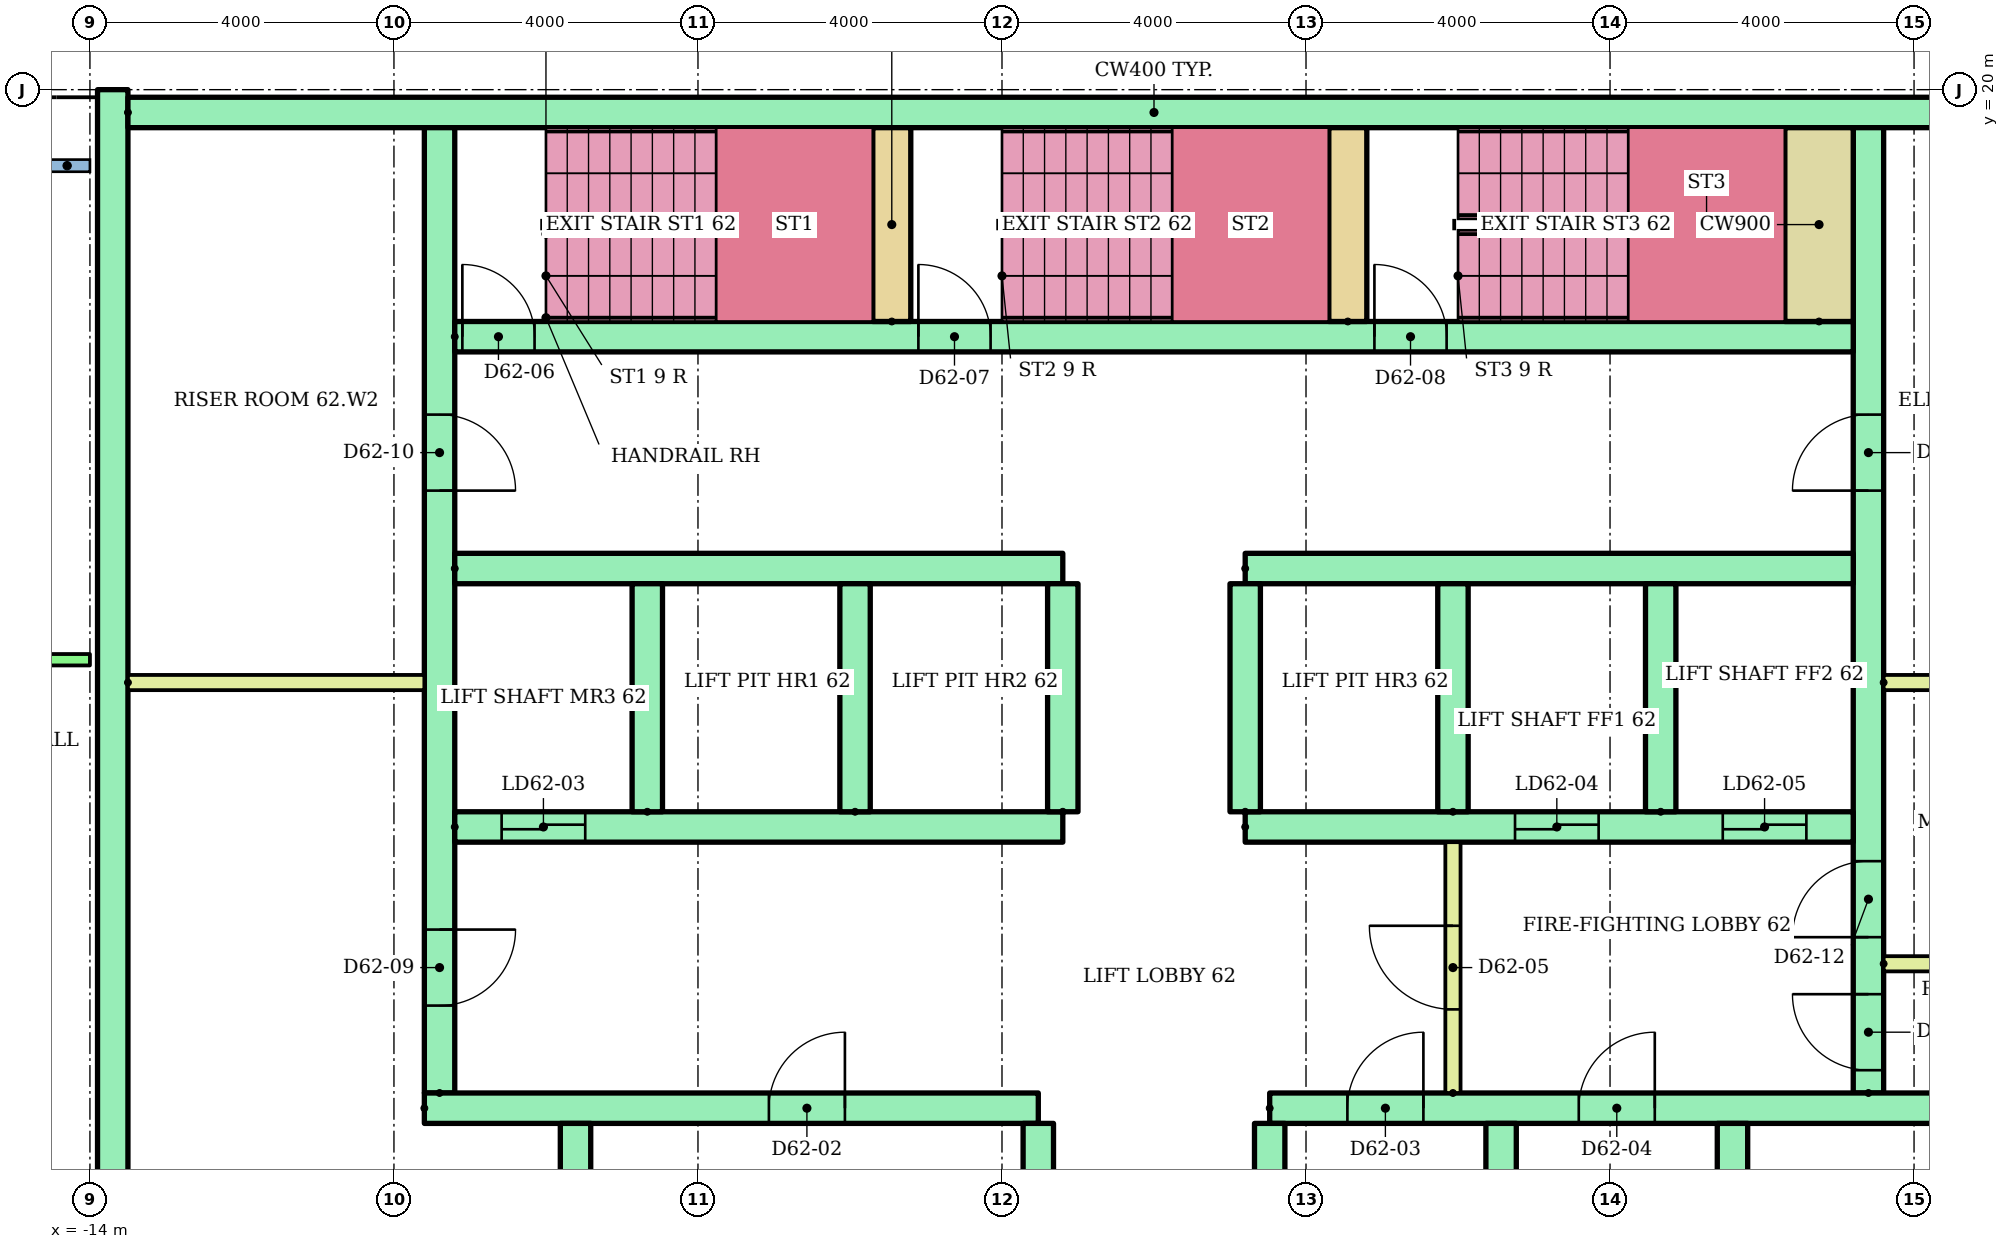
"""IFC4 building model, lengths in metres.
Left out: names, types, materials, properties, quantities, classifications, styles, units other than length and angle.
Written with IfcOpenShell. Run it as: python <this file> out.ifc"""

import sys

from ifc_helpers import new_model, si_unit, direction, frame, frame_2d, origin, place, context, subcontext, project, spatial, rectangle, extrude, element, fill, save


model = new_model("IFC4")
c1 = context("Model", 3, precision=1e-05, world=origin(), true_north=direction((0.0, 1.0)))
c2 = subcontext(c1, "Body", "Model", "MODEL_VIEW")
j1 = project(units=[si_unit("LENGTHUNIT", "METRE"), si_unit("PLANEANGLEUNIT", "RADIAN")], contexts=[c1])
p1 = place(None, origin())
s1 = spatial("IfcSite", under=j1, at=p1, CompositionType="ELEMENT")
p2 = place(p1, origin())
s2 = spatial("IfcBuilding", under=s1, at=p2, CompositionType="ELEMENT")
p3 = place(p2, frame((0.0, 0.0, 236.4)))
s3 = spatial("IfcBuildingStorey", under=s2, at=p3, CompositionType="ELEMENT", Elevation=236.4)
p4 = place(p3, frame((-13.7, 3.0, 0.0), z_axis=(0.0, 0.0, 1.0), x_axis=(0.0, 1.0, 0.0)))
e1 = element("IfcWall", 1, at=p4, inside=s3, PredefinedType="SHEAR", context=c2, shape_type="SweptSolid", body=[
    extrude(rectangle(XDim=17.0, YDim=0.4, at=frame_2d((8.5, 0.0))), origin(), (0.0, 0.0, 1.0), 2.8),
])
p5 = place(p3, frame((-13.5, 19.7, 0.0)))
e2 = element("IfcWall", 2, at=p5, inside=s3, PredefinedType="SHEAR", context=c2, shape_type="SweptSolid", body=[
    extrude(rectangle(XDim=27.0, YDim=0.4, at=frame_2d((13.5, 0.0))), origin(), (0.0, 0.0, 1.0), 2.8),
])
p6 = place(p3, frame((-9.4, 6.8, 0.0), z_axis=(0.0, 0.0, 1.0), x_axis=(0.0, 1.0, 0.0)))
e3 = element("IfcWall", 3, at=p6, inside=s3, PredefinedType="SHEAR", context=c2, shape_type="SweptSolid", body=[
    extrude(rectangle(XDim=12.7, YDim=0.4, at=frame_2d((6.35, 0.0))), origin(), (0.0, 0.0, 1.0), 2.8),
])
p7 = place(p6, frame((1.15, 0.0, 0.0)))
e4 = element("IfcOpeningElement", 4, at=p7, cuts=e3, PredefinedType="OPENING", context=c2, shape_type="SweptSolid", body=[
    extrude(rectangle(XDim=1.0, YDim=2.1, at=frame_2d((0.5, 1.05))), frame((0.0, 0.21, 0.0), z_axis=(0.0, -1.0, 0.0), x_axis=(1.0, 0.0, 0.0)), (0.0, 0.0, 1.0), 0.42),
])
p8 = place(p6, frame((7.925, 0.0, 0.0)))
e5 = element("IfcOpeningElement", 5, at=p8, cuts=e3, PredefinedType="OPENING", context=c2, shape_type="SweptSolid", body=[
    extrude(rectangle(XDim=1.0, YDim=2.1, at=frame_2d((0.5, 1.05))), frame((0.0, 0.21, 0.0), z_axis=(0.0, -1.0, 0.0), x_axis=(1.0, 0.0, 0.0)), (0.0, 0.0, 1.0), 0.42),
])
p9 = place(p3, frame((9.4, 6.8, 0.0), z_axis=(0.0, 0.0, 1.0), x_axis=(0.0, 1.0, 0.0)))
e6 = element("IfcWall", 6, at=p9, inside=s3, PredefinedType="SHEAR", context=c2, shape_type="SweptSolid", body=[
    extrude(rectangle(XDim=12.7, YDim=0.4, at=frame_2d((6.35, 0.0))), origin(), (0.0, 0.0, 1.0), 2.8),
])
p10 = place(p9, frame((0.3, 0.0, 0.0)))
e7 = element("IfcOpeningElement", 7, at=p10, cuts=e6, PredefinedType="OPENING", context=c2, shape_type="SweptSolid", body=[
    extrude(rectangle(XDim=1.0, YDim=2.1, at=frame_2d((0.5, 1.05))), frame((0.0, 0.21, 0.0), z_axis=(0.0, -1.0, 0.0), x_axis=(1.0, 0.0, 0.0)), (0.0, 0.0, 1.0), 0.42),
])
p11 = place(p9, frame((2.05, 0.0, 0.0)))
e8 = element("IfcOpeningElement", 8, at=p11, cuts=e6, PredefinedType="OPENING", context=c2, shape_type="SweptSolid", body=[
    extrude(rectangle(XDim=1.0, YDim=2.1, at=frame_2d((0.5, 1.05))), frame((0.0, 0.21, 0.0), z_axis=(0.0, -1.0, 0.0), x_axis=(1.0, 0.0, 0.0)), (0.0, 0.0, 1.0), 0.42),
])
p12 = place(p9, frame((7.925, 0.0, 0.0)))
e9 = element("IfcOpeningElement", 9, at=p12, cuts=e6, PredefinedType="OPENING", context=c2, shape_type="SweptSolid", body=[
    extrude(rectangle(XDim=1.0, YDim=2.1, at=frame_2d((0.5, 1.05))), frame((0.0, 0.21, 0.0), z_axis=(0.0, -1.0, 0.0), x_axis=(1.0, 0.0, 0.0)), (0.0, 0.0, 1.0), 0.42),
])
p13 = place(p3, frame((-9.6, 6.6, 0.0)))
e10 = element("IfcWall", 10, at=p13, inside=s3, PredefinedType="SHEAR", context=c2, shape_type="SweptSolid", body=[
    extrude(rectangle(XDim=8.078, YDim=0.4, at=frame_2d((4.039, 0.0))), origin(), (0.0, 0.0, 1.0), 2.8),
])
p14 = place(p13, frame((4.533, 0.0, 0.0)))
e11 = element("IfcOpeningElement", 11, at=p14, cuts=e10, PredefinedType="OPENING", context=c2, shape_type="SweptSolid", body=[
    extrude(rectangle(XDim=1.0, YDim=2.1, at=frame_2d((0.5, 1.05))), frame((0.0, 0.21, 0.0), z_axis=(0.0, -1.0, 0.0), x_axis=(1.0, 0.0, 0.0)), (0.0, 0.0, 1.0), 0.42),
])
p15 = place(p3, frame((1.522, 6.6, 0.0)))
e12 = element("IfcWall", 12, at=p15, inside=s3, PredefinedType="SHEAR", context=c2, shape_type="SweptSolid", body=[
    extrude(rectangle(XDim=11.978, YDim=0.4, at=frame_2d((5.989, 0.0))), origin(), (0.0, 0.0, 1.0), 2.8),
])
p16 = place(p15, frame((1.022, 0.0, 0.0)))
e13 = element("IfcOpeningElement", 13, at=p16, cuts=e12, PredefinedType="OPENING", context=c2, shape_type="SweptSolid", body=[
    extrude(rectangle(XDim=1.0, YDim=2.1, at=frame_2d((0.5, 1.05))), frame((0.0, 0.21, 0.0), z_axis=(0.0, -1.0, 0.0), x_axis=(1.0, 0.0, 0.0)), (0.0, 0.0, 1.0), 0.42),
])
p17 = place(p15, frame((4.067, 0.0, 0.0)))
e14 = element("IfcOpeningElement", 14, at=p17, cuts=e12, PredefinedType="OPENING", context=c2, shape_type="SweptSolid", body=[
    extrude(rectangle(XDim=1.0, YDim=2.1, at=frame_2d((0.5, 1.05))), frame((0.0, 0.21, 0.0), z_axis=(0.0, -1.0, 0.0), x_axis=(1.0, 0.0, 0.0)), (0.0, 0.0, 1.0), 0.42),
])
for number, where, z_axis, x_axis in (
    (15, (-7.611, 3.4, 0.0), (0.0, 0.0, 1.0), (0.0, 1.0, 0.0)),
    (16, (-1.522, 3.4, 0.0), (0.0, 0.0, 1.0), (0.0, 1.0, 0.0)),
    (17, (1.522, 3.4, 0.0), (0.0, 0.0, 1.0), (0.0, 1.0, 0.0)),
    (18, (4.567, 3.4, 0.0), (0.0, 0.0, 1.0), (0.0, 1.0, 0.0)),
    (19, (7.611, 3.4, 0.0), (0.0, 0.0, 1.0), (0.0, 1.0, 0.0)),
):
    element("IfcWall", number, at=place(p3, frame(where, z_axis=z_axis, x_axis=x_axis)), inside=s3, PredefinedType="SHEAR", context=c2, shape_type="SweptSolid", body=[
        extrude(rectangle(XDim=3.0, YDim=0.4, at=frame_2d((1.5, 0.0))), origin(), (0.0, 0.0, 1.0), 2.8),
    ])
p18 = place(p3, frame((-9.2, 10.3, 0.0)))
e20 = element("IfcWall", 20, at=p18, inside=s3, PredefinedType="SHEAR", context=c2, shape_type="SweptSolid", body=[
    extrude(rectangle(XDim=8.0, YDim=0.4, at=frame_2d((4.0, 0.0))), origin(), (0.0, 0.0, 1.0), 2.8),
])
p19 = place(p18, frame((0.617, 0.0, 0.0)))
e21 = element("IfcOpeningElement", 21, at=p19, cuts=e20, PredefinedType="OPENING", context=c2, shape_type="SweptSolid", body=[
    extrude(rectangle(XDim=1.1, YDim=2.1, at=frame_2d((0.55, 1.05))), frame((0.0, 0.21, 0.0), z_axis=(0.0, -1.0, 0.0), x_axis=(1.0, 0.0, 0.0)), (0.0, 0.0, 1.0), 0.42),
])
p20 = place(p3, frame((-9.2, 13.7, 0.0)))
e22 = element("IfcWall", 22, at=p20, inside=s3, PredefinedType="SHEAR", context=c2, shape_type="SweptSolid", body=[
    extrude(rectangle(XDim=8.0, YDim=0.4, at=frame_2d((4.0, 0.0))), origin(), (0.0, 0.0, 1.0), 2.8),
])
p21 = place(p3, frame((1.2, 10.3, 0.0)))
e23 = element("IfcWall", 23, at=p21, inside=s3, PredefinedType="SHEAR", context=c2, shape_type="SweptSolid", body=[
    extrude(rectangle(XDim=8.0, YDim=0.4, at=frame_2d((4.0, 0.0))), origin(), (0.0, 0.0, 1.0), 2.8),
])
p22 = place(p21, frame((3.55, 0.0, 0.0)))
e24 = element("IfcOpeningElement", 24, at=p22, cuts=e23, PredefinedType="OPENING", context=c2, shape_type="SweptSolid", body=[
    extrude(rectangle(XDim=1.1, YDim=2.1, at=frame_2d((0.55, 1.05))), frame((0.0, 0.21, 0.0), z_axis=(0.0, -1.0, 0.0), x_axis=(1.0, 0.0, 0.0)), (0.0, 0.0, 1.0), 0.42),
])
p23 = place(p21, frame((6.283, 0.0, 0.0)))
e25 = element("IfcOpeningElement", 25, at=p23, cuts=e23, PredefinedType="OPENING", context=c2, shape_type="SweptSolid", body=[
    extrude(rectangle(XDim=1.1, YDim=2.1, at=frame_2d((0.55, 1.05))), frame((0.0, 0.21, 0.0), z_axis=(0.0, -1.0, 0.0), x_axis=(1.0, 0.0, 0.0)), (0.0, 0.0, 1.0), 0.42),
])
p24 = place(p3, frame((1.2, 13.7, 0.0)))
e26 = element("IfcWall", 26, at=p24, inside=s3, PredefinedType="SHEAR", context=c2, shape_type="SweptSolid", body=[
    extrude(rectangle(XDim=8.0, YDim=0.4, at=frame_2d((4.0, 0.0))), origin(), (0.0, 0.0, 1.0), 2.8),
])
for number, where, z_axis, x_axis in (
    (27, (-6.667, 10.5, 0.0), (0.0, 0.0, 1.0), (0.0, 1.0, 0.0)),
    (28, (-3.933, 10.5, 0.0), (0.0, 0.0, 1.0), (0.0, 1.0, 0.0)),
    (29, (-1.2, 10.5, 0.0), (0.0, 0.0, 1.0), (0.0, 1.0, 0.0)),
    (30, (1.2, 10.5, 0.0), (0.0, 0.0, 1.0), (0.0, 1.0, 0.0)),
    (31, (3.933, 10.5, 0.0), (0.0, 0.0, 1.0), (0.0, 1.0, 0.0)),
    (32, (6.667, 10.5, 0.0), (0.0, 0.0, 1.0), (0.0, 1.0, 0.0)),
):
    element("IfcWall", number, at=place(p3, frame(where, z_axis=z_axis, x_axis=x_axis)), inside=s3, PredefinedType="SHEAR", context=c2, shape_type="SweptSolid", body=[
        extrude(rectangle(XDim=3.0, YDim=0.4, at=frame_2d((1.5, 0.0))), origin(), (0.0, 0.0, 1.0), 2.8),
    ])
p25 = place(p3, frame((3.933, 6.8, 0.0), z_axis=(0.0, 0.0, 1.0), x_axis=(0.0, 1.0, 0.0)))
e33 = element("IfcWall", 33, at=p25, inside=s3, PredefinedType="PARTITIONING", context=c2, shape_type="SweptSolid", body=[
    extrude(rectangle(XDim=3.3, YDim=0.2, at=frame_2d((1.65, 0.0))), origin(), (0.0, 0.0, 1.0), 2.8),
])
p26 = place(p25, frame((1.1, 0.0, 0.0)))
e34 = element("IfcOpeningElement", 34, at=p26, cuts=e33, PredefinedType="OPENING", context=c2, shape_type="SweptSolid", body=[
    extrude(rectangle(XDim=1.1, YDim=2.1, at=frame_2d((0.55, 1.05))), frame((0.0, 0.11, 0.0), z_axis=(0.0, -1.0, 0.0), x_axis=(1.0, 0.0, 0.0)), (0.0, 0.0, 1.0), 0.22),
])
p27 = place(p3, frame((-9.2, 16.75, 0.0)))
e35 = element("IfcWall", 35, at=p27, inside=s3, PredefinedType="SHEAR", context=c2, shape_type="SweptSolid", body=[
    extrude(rectangle(XDim=18.4, YDim=0.4, at=frame_2d((9.2, 0.0))), origin(), (0.0, 0.0, 1.0), 2.8),
])
p28 = place(p27, frame((0.1, 0.0, 0.0)))
e36 = element("IfcOpeningElement", 36, at=p28, cuts=e35, PredefinedType="OPENING", context=c2, shape_type="SweptSolid", body=[
    extrude(rectangle(XDim=0.95, YDim=2.1, at=frame_2d((0.475, 1.05))), frame((0.0, 0.21, 0.0), z_axis=(0.0, -1.0, 0.0), x_axis=(1.0, 0.0, 0.0)), (0.0, 0.0, 1.0), 0.42),
])
p29 = place(p27, frame((6.1, 0.0, 0.0)))
e37 = element("IfcOpeningElement", 37, at=p29, cuts=e35, PredefinedType="OPENING", context=c2, shape_type="SweptSolid", body=[
    extrude(rectangle(XDim=0.95, YDim=2.1, at=frame_2d((0.475, 1.05))), frame((0.0, 0.21, 0.0), z_axis=(0.0, -1.0, 0.0), x_axis=(1.0, 0.0, 0.0)), (0.0, 0.0, 1.0), 0.42),
])
p30 = place(p27, frame((12.1, 0.0, 0.0)))
e38 = element("IfcOpeningElement", 38, at=p30, cuts=e35, PredefinedType="OPENING", context=c2, shape_type="SweptSolid", body=[
    extrude(rectangle(XDim=0.95, YDim=2.1, at=frame_2d((0.475, 1.05))), frame((0.0, 0.21, 0.0), z_axis=(0.0, -1.0, 0.0), x_axis=(1.0, 0.0, 0.0)), (0.0, 0.0, 1.0), 0.42),
])
for number, where, z_axis, x_axis in (
    (39, (-3.45, 16.95, 0.0), (0.0, 0.0, 1.0), (0.0, 1.0, 0.0)),
    (40, (2.55, 16.95, 0.0), (0.0, 0.0, 1.0), (0.0, 1.0, 0.0)),
):
    element("IfcWall", number, at=place(p3, frame(where, z_axis=z_axis, x_axis=x_axis)), inside=s3, PredefinedType="SHEAR", context=c2, shape_type="SweptSolid", body=[
        extrude(rectangle(XDim=2.55, YDim=0.5, at=frame_2d((1.275, 0.0))), origin(), (0.0, 0.0, 1.0), 2.8),
    ])
p31 = place(p3, frame((8.75, 16.95, 0.0), z_axis=(0.0, 0.0, 1.0), x_axis=(0.0, 1.0, 0.0)))
e41 = element("IfcWall", 41, at=p31, inside=s3, PredefinedType="SHEAR", context=c2, shape_type="SweptSolid", body=[
    extrude(rectangle(XDim=2.55, YDim=0.9, at=frame_2d((1.275, 0.0))), origin(), (0.0, 0.0, 1.0), 2.8),
])
for number, where in (
    (42, (-13.5, 12.2, 0.0)),
    (43, (9.6, 8.5, 0.0)),
    (44, (9.6, 12.2, 0.0)),
):
    element("IfcWall", number, at=place(p3, frame(where)), inside=s3, PredefinedType="PARTITIONING", context=c2, shape_type="SweptSolid", body=[
        extrude(rectangle(XDim=3.9, YDim=0.2, at=frame_2d((1.95, 0.0))), origin(), (0.0, 0.0, 1.0), 2.8),
    ])
p32 = place(p3, frame((-28.92, 12.5, 0.0)))
e45 = element("IfcWall", 45, at=p32, inside=s3, PredefinedType="PARTITIONING", context=c2, shape_type="SweptSolid", body=[
    extrude(rectangle(XDim=14.92, YDim=0.15, at=frame_2d((7.46, 0.0))), origin(), (0.0, 0.0, 1.0), 2.4),
])
p33 = place(p32, frame((1.97, 0.0, 0.0)))
e46 = element("IfcOpeningElement", 46, at=p33, cuts=e45, PredefinedType="OPENING", context=c2, shape_type="SweptSolid", body=[
    extrude(rectangle(XDim=1.0, YDim=2.1, at=frame_2d((0.5, 1.05))), frame((0.0, 0.085, 0.0), z_axis=(0.0, -1.0, 0.0), x_axis=(1.0, 0.0, 0.0)), (0.0, 0.0, 1.0), 0.17),
])
p34 = place(p32, frame((9.32, 0.0, 0.0)))
e47 = element("IfcOpeningElement", 47, at=p34, cuts=e45, PredefinedType="OPENING", context=c2, shape_type="SweptSolid", body=[
    extrude(rectangle(XDim=1.0, YDim=2.1, at=frame_2d((0.5, 1.05))), frame((0.0, 0.085, 0.0), z_axis=(0.0, -1.0, 0.0), x_axis=(1.0, 0.0, 0.0)), (0.0, 0.0, 1.0), 0.17),
])
p35 = place(p14, origin())
e48 = element("IfcDoor", 48, at=p35, inside=s3, OperationType="SINGLE_SWING_RIGHT", PredefinedType="DOOR", context=c2, shape_type="SweptSolid", body=[
    extrude(rectangle(XDim=1.0, YDim=2.1, at=frame_2d((0.5, 1.05))), frame((0.0, 0.025, 0.0), z_axis=(0.0, -1.0, 0.0), x_axis=(1.0, 0.0, 0.0)), (0.0, 0.0, 1.0), 0.05),
])
fill(e11, e48)
p36 = place(p16, origin())
e49 = element("IfcDoor", 49, at=p36, inside=s3, OperationType="SINGLE_SWING_RIGHT", PredefinedType="DOOR", context=c2, shape_type="SweptSolid", body=[
    extrude(rectangle(XDim=1.0, YDim=2.1, at=frame_2d((0.5, 1.05))), frame((0.0, 0.025, 0.0), z_axis=(0.0, -1.0, 0.0), x_axis=(1.0, 0.0, 0.0)), (0.0, 0.0, 1.0), 0.05),
])
fill(e13, e49)
p37 = place(p17, origin())
e50 = element("IfcDoor", 50, at=p37, inside=s3, OperationType="SINGLE_SWING_RIGHT", PredefinedType="DOOR", context=c2, shape_type="SweptSolid", body=[
    extrude(rectangle(XDim=1.0, YDim=2.1, at=frame_2d((0.5, 1.05))), frame((0.0, 0.025, 0.0), z_axis=(0.0, -1.0, 0.0), x_axis=(1.0, 0.0, 0.0)), (0.0, 0.0, 1.0), 0.05),
])
fill(e14, e50)
p38 = place(p19, origin())
e51 = element("IfcDoor", 51, at=p38, inside=s3, OperationType="SLIDING_TO_LEFT", PredefinedType="DOOR", context=c2, shape_type="SweptSolid", body=[
    extrude(rectangle(XDim=1.1, YDim=2.1, at=frame_2d((0.55, 1.05))), frame((0.0, 0.025, 0.0), z_axis=(0.0, -1.0, 0.0), x_axis=(1.0, 0.0, 0.0)), (0.0, 0.0, 1.0), 0.05),
])
fill(e21, e51)
p39 = place(p22, origin())
e52 = element("IfcDoor", 52, at=p39, inside=s3, OperationType="SLIDING_TO_LEFT", PredefinedType="DOOR", context=c2, shape_type="SweptSolid", body=[
    extrude(rectangle(XDim=1.1, YDim=2.1, at=frame_2d((0.55, 1.05))), frame((0.0, 0.025, 0.0), z_axis=(0.0, -1.0, 0.0), x_axis=(1.0, 0.0, 0.0)), (0.0, 0.0, 1.0), 0.05),
])
fill(e24, e52)
p40 = place(p23, origin())
e53 = element("IfcDoor", 53, at=p40, inside=s3, OperationType="SLIDING_TO_LEFT", PredefinedType="DOOR", context=c2, shape_type="SweptSolid", body=[
    extrude(rectangle(XDim=1.1, YDim=2.1, at=frame_2d((0.55, 1.05))), frame((0.0, 0.025, 0.0), z_axis=(0.0, -1.0, 0.0), x_axis=(1.0, 0.0, 0.0)), (0.0, 0.0, 1.0), 0.05),
])
fill(e25, e53)
p41 = place(p26, origin())
e54 = element("IfcDoor", 54, at=p41, inside=s3, OperationType="SINGLE_SWING_RIGHT", PredefinedType="DOOR", context=c2, shape_type="SweptSolid", body=[
    extrude(rectangle(XDim=1.1, YDim=2.1, at=frame_2d((0.55, 1.05))), frame((0.0, 0.025, 0.0), z_axis=(0.0, -1.0, 0.0), x_axis=(1.0, 0.0, 0.0)), (0.0, 0.0, 1.0), 0.05),
])
fill(e34, e54)
p42 = place(p28, origin())
e55 = element("IfcDoor", 55, at=p42, inside=s3, OperationType="SINGLE_SWING_LEFT", PredefinedType="DOOR", context=c2, shape_type="SweptSolid", body=[
    extrude(rectangle(XDim=0.95, YDim=2.1, at=frame_2d((0.475, 1.05))), frame((0.0, 0.025, 0.0), z_axis=(0.0, -1.0, 0.0), x_axis=(1.0, 0.0, 0.0)), (0.0, 0.0, 1.0), 0.05),
])
fill(e36, e55)
p43 = place(p29, origin())
e56 = element("IfcDoor", 56, at=p43, inside=s3, OperationType="SINGLE_SWING_LEFT", PredefinedType="DOOR", context=c2, shape_type="SweptSolid", body=[
    extrude(rectangle(XDim=0.95, YDim=2.1, at=frame_2d((0.475, 1.05))), frame((0.0, 0.025, 0.0), z_axis=(0.0, -1.0, 0.0), x_axis=(1.0, 0.0, 0.0)), (0.0, 0.0, 1.0), 0.05),
])
fill(e37, e56)
p44 = place(p30, origin())
e57 = element("IfcDoor", 57, at=p44, inside=s3, OperationType="SINGLE_SWING_LEFT", PredefinedType="DOOR", context=c2, shape_type="SweptSolid", body=[
    extrude(rectangle(XDim=0.95, YDim=2.1, at=frame_2d((0.475, 1.05))), frame((0.0, 0.025, 0.0), z_axis=(0.0, -1.0, 0.0), x_axis=(1.0, 0.0, 0.0)), (0.0, 0.0, 1.0), 0.05),
])
fill(e38, e57)
p45 = place(p7, frame((1.0, 0.0, 0.0), z_axis=(0.0, 0.0, 1.0), x_axis=(-1.0, 0.0, 0.0)))
e58 = element("IfcDoor", 58, at=p45, inside=s3, OperationType="SINGLE_SWING_RIGHT", PredefinedType="DOOR", context=c2, shape_type="SweptSolid", body=[
    extrude(rectangle(XDim=1.0, YDim=2.1, at=frame_2d((0.5, 1.05))), frame((0.0, 0.025, 0.0), z_axis=(0.0, -1.0, 0.0), x_axis=(1.0, 0.0, 0.0)), (0.0, 0.0, 1.0), 0.05),
])
fill(e4, e58)
p46 = place(p8, frame((1.0, 0.0, 0.0), z_axis=(0.0, 0.0, 1.0), x_axis=(-1.0, 0.0, 0.0)))
e59 = element("IfcDoor", 59, at=p46, inside=s3, OperationType="SINGLE_SWING_LEFT", PredefinedType="DOOR", context=c2, shape_type="SweptSolid", body=[
    extrude(rectangle(XDim=1.0, YDim=2.1, at=frame_2d((0.5, 1.05))), frame((0.0, 0.025, 0.0), z_axis=(0.0, -1.0, 0.0), x_axis=(1.0, 0.0, 0.0)), (0.0, 0.0, 1.0), 0.05),
])
fill(e5, e59)
p47 = place(p10, origin())
e60 = element("IfcDoor", 60, at=p47, inside=s3, OperationType="SINGLE_SWING_RIGHT", PredefinedType="DOOR", context=c2, shape_type="SweptSolid", body=[
    extrude(rectangle(XDim=1.0, YDim=2.1, at=frame_2d((0.5, 1.05))), frame((0.0, 0.025, 0.0), z_axis=(0.0, -1.0, 0.0), x_axis=(1.0, 0.0, 0.0)), (0.0, 0.0, 1.0), 0.05),
])
fill(e7, e60)
p48 = place(p11, origin())
e61 = element("IfcDoor", 61, at=p48, inside=s3, OperationType="SINGLE_SWING_LEFT", PredefinedType="DOOR", context=c2, shape_type="SweptSolid", body=[
    extrude(rectangle(XDim=1.0, YDim=2.1, at=frame_2d((0.5, 1.05))), frame((0.0, 0.025, 0.0), z_axis=(0.0, -1.0, 0.0), x_axis=(1.0, 0.0, 0.0)), (0.0, 0.0, 1.0), 0.05),
])
fill(e8, e61)
p49 = place(p12, origin())
e62 = element("IfcDoor", 62, at=p49, inside=s3, OperationType="SINGLE_SWING_LEFT", PredefinedType="DOOR", context=c2, shape_type="SweptSolid", body=[
    extrude(rectangle(XDim=1.0, YDim=2.1, at=frame_2d((0.5, 1.05))), frame((0.0, 0.025, 0.0), z_axis=(0.0, -1.0, 0.0), x_axis=(1.0, 0.0, 0.0)), (0.0, 0.0, 1.0), 0.05),
])
fill(e9, e62)
save(model, sys.argv[1])
